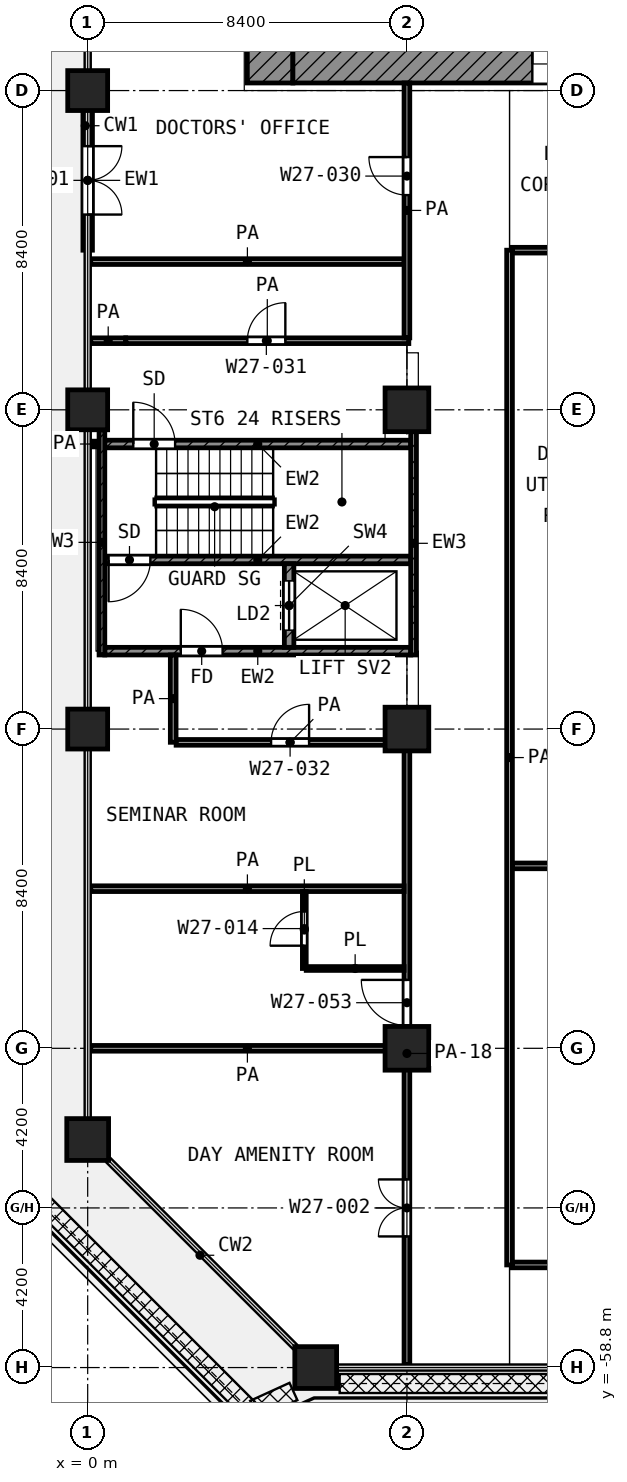
"""IFC4 building model, lengths in metres.
Left out: names, types, materials, properties, quantities, classifications, styles, units other than length and angle.
Written with IfcOpenShell. Run it as: python <this file> out.ifc"""

import sys

from ifc_helpers import new_model, si_unit, direction, frame, frame_2d, origin, origin_2d, place, context, subcontext, project, spatial, rectangle, extrude, element, fill, save


model = new_model("IFC4")
c1 = context("Model", 3, precision=1e-05, world=origin(), true_north=direction((0.0, 1.0)))
c2 = subcontext(c1, "Body", "Model", "MODEL_VIEW")
j1 = project(units=[si_unit("LENGTHUNIT", "METRE"), si_unit("PLANEANGLEUNIT", "RADIAN")], contexts=[c1])
p1 = place(None, origin())
s1 = spatial("IfcSite", under=j1, at=p1, CompositionType="ELEMENT")
p2 = place(p1, origin())
s2 = spatial("IfcBuilding", under=s1, at=p2, CompositionType="ELEMENT")
p3 = place(p2, frame((0.0, 0.0, 119.8)))
s3 = spatial("IfcBuildingStorey", under=s2, at=p3, CompositionType="ELEMENT", Elevation=119.8)
for number, where, z_axis, x_axis in (
    (1, (0.0, -25.2, 0.0), (0.0, 0.0, 1.0), (1.0, 0.0, 0.0)),
    (2, (0.0, -33.6, 0.0), (0.0, 0.0, 1.0), (1.0, 0.0, 0.0)),
):
    element("IfcColumn", number, at=place(p3, frame(where, z_axis=z_axis, x_axis=x_axis)), inside=s3, PredefinedType="COLUMN", context=c2, shape_type="SweptSolid", body=[
        extrude(rectangle(XDim=1.05, YDim=1.05, at=origin_2d()), origin(), (0.0, 0.0, 1.0), 4.2),
    ])
p4 = place(p3, frame((8.4, -33.6, 0.0), z_axis=(0.0, 0.0, 1.0), x_axis=(1.0, 0.0, 0.0)))
e3 = element("IfcColumn", 3, at=p4, inside=s3, PredefinedType="COLUMN", context=c2, shape_type="SweptSolid", body=[
    extrude(rectangle(XDim=1.15, YDim=1.15, at=origin_2d()), origin(), (0.0, 0.0, 1.0), 4.2),
])
p5 = place(p3, frame((0.0, -42.0, 0.0), z_axis=(0.0, 0.0, 1.0), x_axis=(1.0, 0.0, 0.0)))
e4 = element("IfcColumn", 4, at=p5, inside=s3, PredefinedType="COLUMN", context=c2, shape_type="SweptSolid", body=[
    extrude(rectangle(XDim=1.05, YDim=1.05, at=origin_2d()), origin(), (0.0, 0.0, 1.0), 4.2),
])
for number, where, z_axis, x_axis in (
    (5, (8.4, -42.0, 0.0), (0.0, 0.0, 1.0), (1.0, 0.0, 0.0)),
    (6, (8.4, -50.4, 0.0), (0.0, 0.0, 1.0), (1.0, 0.0, 0.0)),
):
    element("IfcColumn", number, at=place(p3, frame(where, z_axis=z_axis, x_axis=x_axis)), inside=s3, PredefinedType="COLUMN", context=c2, shape_type="SweptSolid", body=[
        extrude(rectangle(XDim=1.15, YDim=1.15, at=origin_2d()), origin(), (0.0, 0.0, 1.0), 4.2),
    ])
for number, where, z_axis, x_axis in (
    (7, (0.0, -52.8, 0.0), (0.0, 0.0, 1.0), (1.0, 0.0, 0.0)),
    (8, (6.0, -58.8, 0.0), (0.0, 0.0, 1.0), (1.0, 0.0, 0.0)),
):
    element("IfcColumn", number, at=place(p3, frame(where, z_axis=z_axis, x_axis=x_axis)), inside=s3, PredefinedType="COLUMN", context=c2, shape_type="SweptSolid", body=[
        extrude(rectangle(XDim=1.1, YDim=1.1, at=origin_2d()), origin(), (0.0, 0.0, 1.0), 4.2),
    ])
p6 = place(p3, frame((0.0, -25.725, 0.0), z_axis=(0.0, 0.0, 1.0), x_axis=(0.0, -1.0, 0.0)))
e9 = element("IfcWall", 9, at=p6, inside=s3, PredefinedType="SOLIDWALL", context=c2, shape_type="SweptSolid", body=[
    extrude(rectangle(XDim=3.675, YDim=0.25, at=frame_2d((1.837, 0.0))), origin(), (0.0, 0.0, 1.0), 3.48),
])
p7 = place(p6, frame((0.938, 0.0, 0.0)))
e10 = element("IfcOpeningElement", 10, at=p7, cuts=e9, PredefinedType="OPENING", context=c2, shape_type="SweptSolid", body=[
    extrude(rectangle(XDim=1.8, YDim=2.1, at=frame_2d((0.9, 1.05))), frame((0.0, 0.135, 0.0), z_axis=(0.0, -1.0, 0.0), x_axis=(1.0, 0.0, 0.0)), (0.0, 0.0, 1.0), 0.27),
])
p8 = place(p3, frame((4.8, -25.0, 0.0), z_axis=(0.0, 0.0, 1.0), x_axis=(0.0, 1.0, 0.0)))
e11 = element("IfcWall", 11, at=p8, inside=s3, PredefinedType="SHEAR", context=c2, shape_type="SweptSolid", body=[
    extrude(rectangle(XDim=19.6, YDim=1.2, at=frame_2d((9.8, 0.0))), origin(), (0.0, 0.0, 1.0), 3.6),
])
p9 = place(p8, frame((11.45, 0.0, 0.0)))
e12 = element("IfcOpeningElement", 12, at=p9, cuts=e11, PredefinedType="OPENING", context=c2, shape_type="SweptSolid", body=[
    extrude(rectangle(XDim=1.1, YDim=2.1, at=frame_2d((0.55, 1.05))), frame((0.0, 0.61, 0.0), z_axis=(0.0, -1.0, 0.0), x_axis=(1.0, 0.0, 0.0)), (0.0, 0.0, 1.0), 1.22),
])
p10 = place(p8, frame((2.15, 0.0, 0.0)))
e13 = element("IfcOpeningElement", 13, at=p10, cuts=e11, PredefinedType="OPENING", context=c2, shape_type="SweptSolid", body=[
    extrude(rectangle(XDim=1.1, YDim=2.1, at=frame_2d((0.55, 1.05))), frame((0.0, 0.61, 0.0), z_axis=(0.0, -1.0, 0.0), x_axis=(1.0, 0.0, 0.0)), (0.0, 0.0, 1.0), 1.22),
])
p11 = place(p3, frame((5.4, -24.5, 0.0), z_axis=(0.0, 0.0, 1.0), x_axis=(1.0, 0.0, 0.0)))
e14 = element("IfcWall", 14, at=p11, inside=s3, PredefinedType="SHEAR", context=c2, shape_type="SweptSolid", body=[
    extrude(rectangle(XDim=18.6, YDim=1.0, at=frame_2d((9.3, 0.0))), origin(), (0.0, 0.0, 1.0), 3.6),
])
p12 = place(p11, frame((6.3, 0.0, 0.0)))
e15 = element("IfcOpeningElement", 15, at=p12, cuts=e14, PredefinedType="OPENING", context=c2, shape_type="SweptSolid", body=[
    extrude(rectangle(XDim=1.8, YDim=2.1, at=frame_2d((0.9, 1.05))), frame((0.0, 0.51, 0.0), z_axis=(0.0, -1.0, 0.0), x_axis=(1.0, 0.0, 0.0)), (0.0, 0.0, 1.0), 1.02),
])
p13 = place(p3, frame((0.375, -40.05, 0.0), z_axis=(0.0, 0.0, 1.0), x_axis=(0.0, 1.0, 0.0)))
e16 = element("IfcWall", 16, at=p13, inside=s3, PredefinedType="SHEAR", context=c2, shape_type="SweptSolid", body=[
    extrude(rectangle(XDim=5.925, YDim=0.15, at=frame_2d((2.962, 0.0))), origin(), (0.0, 0.0, 1.0), 3.6),
])
p14 = place(p3, frame((8.575, -40.05, 0.0), z_axis=(0.0, 0.0, 1.0), x_axis=(0.0, 1.0, 0.0)))
e17 = element("IfcWall", 17, at=p14, inside=s3, PredefinedType="SHEAR", context=c2, shape_type="SweptSolid", body=[
    extrude(rectangle(XDim=5.875, YDim=0.15, at=frame_2d((2.938, 0.0))), origin(), (0.0, 0.0, 1.0), 3.6),
])
p15 = place(p3, frame((0.45, -34.5, 0.0), z_axis=(0.0, 0.0, 1.0), x_axis=(1.0, 0.0, 0.0)))
e18 = element("IfcWall", 18, at=p15, inside=s3, PredefinedType="SHEAR", context=c2, shape_type="SweptSolid", body=[
    extrude(rectangle(XDim=8.05, YDim=0.2, at=frame_2d((4.025, 0.0))), origin(), (0.0, 0.0, 1.0), 3.6),
])
p16 = place(p15, frame((0.75, 0.0, 0.0)))
e19 = element("IfcOpeningElement", 19, at=p16, cuts=e18, PredefinedType="OPENING", context=c2, shape_type="SweptSolid", body=[
    extrude(rectangle(XDim=1.1, YDim=2.1, at=frame_2d((0.55, 1.05))), frame((0.0, 0.11, 0.0), z_axis=(0.0, -1.0, 0.0), x_axis=(1.0, 0.0, 0.0)), (0.0, 0.0, 1.0), 0.22),
])
p17 = place(p3, frame((0.45, -37.55, 0.0), z_axis=(0.0, 0.0, 1.0), x_axis=(1.0, 0.0, 0.0)))
e20 = element("IfcWall", 20, at=p17, inside=s3, PredefinedType="SHEAR", context=c2, shape_type="SweptSolid", body=[
    extrude(rectangle(XDim=8.05, YDim=0.2, at=frame_2d((4.025, 0.0))), origin(), (0.0, 0.0, 1.0), 3.6),
])
p18 = place(p17, frame((0.1, 0.0, 0.0)))
e21 = element("IfcOpeningElement", 21, at=p18, cuts=e20, PredefinedType="OPENING", context=c2, shape_type="SweptSolid", body=[
    extrude(rectangle(XDim=1.1, YDim=2.1, at=frame_2d((0.55, 1.05))), frame((0.0, 0.11, 0.0), z_axis=(0.0, -1.0, 0.0), x_axis=(1.0, 0.0, 0.0)), (0.0, 0.0, 1.0), 0.22),
])
p19 = place(p3, frame((0.45, -39.95, 0.0), z_axis=(0.0, 0.0, 1.0), x_axis=(1.0, 0.0, 0.0)))
e22 = element("IfcWall", 22, at=p19, inside=s3, PredefinedType="SHEAR", context=c2, shape_type="SweptSolid", body=[
    extrude(rectangle(XDim=8.05, YDim=0.2, at=frame_2d((4.025, 0.0))), origin(), (0.0, 0.0, 1.0), 3.6),
])
p20 = place(p19, frame((2.0, 0.0, 0.0)))
e23 = element("IfcOpeningElement", 23, at=p20, cuts=e22, PredefinedType="OPENING", context=c2, shape_type="SweptSolid", body=[
    extrude(rectangle(XDim=1.1, YDim=2.1, at=frame_2d((0.55, 1.05))), frame((0.0, 0.11, 0.0), z_axis=(0.0, -1.0, 0.0), x_axis=(1.0, 0.0, 0.0)), (0.0, 0.0, 1.0), 0.22),
])
p21 = place(p3, frame((5.3, -39.85, 0.0), z_axis=(0.0, 0.0, 1.0), x_axis=(0.0, 1.0, 0.0)))
e24 = element("IfcWall", 24, at=p21, inside=s3, PredefinedType="SHEAR", context=c2, shape_type="SweptSolid", body=[
    extrude(rectangle(XDim=2.2, YDim=0.25, at=frame_2d((1.1, 0.0))), origin(), (0.0, 0.0, 1.0), 3.6),
])
p22 = place(p21, frame((0.45, 0.0, 0.0)))
e25 = element("IfcOpeningElement", 25, at=p22, cuts=e24, PredefinedType="OPENING", context=c2, shape_type="SweptSolid", body=[
    extrude(rectangle(XDim=1.3, YDim=2.1, at=frame_2d((0.65, 1.05))), frame((0.0, 0.135, 0.0), z_axis=(0.0, -1.0, 0.0), x_axis=(1.0, 0.0, 0.0)), (0.0, 0.0, 1.0), 0.27),
])
p23 = place(p3, frame((5.75, -48.3, 0.0), z_axis=(0.0, 0.0, 1.0), x_axis=(1.0, 0.0, 0.0)))
e26 = element("IfcWall", 26, at=p23, inside=s3, PredefinedType="PARTITIONING", context=c2, shape_type="SweptSolid", body=[
    extrude(rectangle(XDim=2.575, YDim=0.1, at=frame_2d((1.288, 0.0))), origin(), (0.0, 0.0, 1.0), 3.6),
])
p24 = place(p3, frame((5.7, -48.3, 0.0), z_axis=(0.0, 0.0, 1.0), x_axis=(0.0, 1.0, 0.0)))
e27 = element("IfcWall", 27, at=p24, inside=s3, PredefinedType="PARTITIONING", context=c2, shape_type="SweptSolid", body=[
    extrude(rectangle(XDim=2.025, YDim=0.1, at=frame_2d((1.013, 0.0))), origin(), (0.0, 0.0, 1.0), 3.6),
])
p25 = place(p24, frame((0.6, 0.0, 0.0)))
e28 = element("IfcOpeningElement", 28, at=p25, cuts=e27, PredefinedType="OPENING", context=c2, shape_type="SweptSolid", body=[
    extrude(rectangle(XDim=0.9, YDim=2.1, at=frame_2d((0.45, 1.05))), frame((0.0, 0.06, 0.0), z_axis=(0.0, -1.0, 0.0), x_axis=(1.0, 0.0, 0.0)), (0.0, 0.0, 1.0), 0.12),
])
p26 = place(p3, frame((11.175, -56.1, 0.0), z_axis=(0.0, 0.0, 1.0), x_axis=(1.0, 0.0, 0.0)))
e29 = element("IfcWall", 29, at=p26, inside=s3, PredefinedType="PARTITIONING", context=c2, shape_type="SweptSolid", body=[
    extrude(rectangle(XDim=2.85, YDim=0.15, at=frame_2d((1.425, 0.0))), origin(), (0.0, 0.0, 1.0), 3.6),
])
for number, where, z_axis, x_axis in (
    (30, (0.08, -50.4, 0.0), (0.0, 0.0, 1.0), (1.0, 0.0, 0.0)),
    (31, (0.08, -46.2, 0.0), (0.0, 0.0, 1.0), (1.0, 0.0, 0.0)),
):
    element("IfcWall", number, at=place(p3, frame(where, z_axis=z_axis, x_axis=x_axis)), inside=s3, PredefinedType="PARTITIONING", context=c2, shape_type="SweptSolid", body=[
        extrude(rectangle(XDim=8.245, YDim=0.15, at=frame_2d((4.123, 0.0))), origin(), (0.0, 0.0, 1.0), 3.6),
    ])
p27 = place(p3, frame((11.175, -45.6, 0.0), z_axis=(0.0, 0.0, 1.0), x_axis=(1.0, 0.0, 0.0)))
e32 = element("IfcWall", 32, at=p27, inside=s3, PredefinedType="PARTITIONING", context=c2, shape_type="SweptSolid", body=[
    extrude(rectangle(XDim=2.85, YDim=0.15, at=frame_2d((1.425, 0.0))), origin(), (0.0, 0.0, 1.0), 3.6),
])
p28 = place(p3, frame((2.327, -42.35, 0.0), z_axis=(0.0, 0.0, 1.0), x_axis=(1.0, 0.0, 0.0)))
e33 = element("IfcWall", 33, at=p28, inside=s3, PredefinedType="PARTITIONING", context=c2, shape_type="SweptSolid", body=[
    extrude(rectangle(XDim=5.998, YDim=0.15, at=frame_2d((2.999, 0.0))), origin(), (0.0, 0.0, 1.0), 3.6),
])
p29 = place(p28, frame((2.499, 0.0, 0.0)))
e34 = element("IfcOpeningElement", 34, at=p29, cuts=e33, PredefinedType="OPENING", context=c2, shape_type="SweptSolid", body=[
    extrude(rectangle(XDim=1.0, YDim=2.1, at=frame_2d((0.5, 1.05))), frame((0.0, 0.085, 0.0), z_axis=(0.0, -1.0, 0.0), x_axis=(1.0, 0.0, 0.0)), (0.0, 0.0, 1.0), 0.17),
])
p30 = place(p3, frame((0.08, -34.5, 0.0), z_axis=(0.0, 0.0, 1.0), x_axis=(1.0, 0.0, 0.0)))
e35 = element("IfcWall", 35, at=p30, inside=s3, PredefinedType="PARTITIONING", context=c2, shape_type="SweptSolid", body=[
    extrude(rectangle(XDim=0.19, YDim=0.15, at=frame_2d((0.095, 0.0))), origin(), (0.0, 0.0, 1.0), 3.6),
])
p31 = place(p3, frame((0.08, -31.782, 0.0), z_axis=(0.0, 0.0, 1.0), x_axis=(1.0, 0.0, 0.0)))
e36 = element("IfcWall", 36, at=p31, inside=s3, PredefinedType="PARTITIONING", context=c2, shape_type="SweptSolid", body=[
    extrude(rectangle(XDim=0.92, YDim=0.15, at=frame_2d((0.46, 0.0))), origin(), (0.0, 0.0, 1.0), 3.6),
])
p32 = place(p3, frame((1.002, -31.782, 0.0), z_axis=(0.0, 0.0, 1.0), x_axis=(1.0, 0.0, 0.0)))
e37 = element("IfcWall", 37, at=p32, inside=s3, PredefinedType="PARTITIONING", context=c2, shape_type="SweptSolid", body=[
    extrude(rectangle(XDim=7.448, YDim=0.15, at=frame_2d((3.724, 0.0))), origin(), (0.0, 0.0, 1.0), 3.6),
])
p33 = place(p32, frame((3.199, 0.0, 0.0)))
e38 = element("IfcOpeningElement", 38, at=p33, cuts=e37, PredefinedType="OPENING", context=c2, shape_type="SweptSolid", body=[
    extrude(rectangle(XDim=1.0, YDim=2.1, at=frame_2d((0.5, 1.05))), frame((0.0, 0.085, 0.0), z_axis=(0.0, -1.0, 0.0), x_axis=(1.0, 0.0, 0.0)), (0.0, 0.0, 1.0), 0.17),
])
p34 = place(p3, frame((0.08, -29.7, 0.0), z_axis=(0.0, 0.0, 1.0), x_axis=(1.0, 0.0, 0.0)))
e39 = element("IfcWall", 39, at=p34, inside=s3, PredefinedType="PARTITIONING", context=c2, shape_type="SweptSolid", body=[
    extrude(rectangle(XDim=8.245, YDim=0.15, at=frame_2d((4.123, 0.0))), origin(), (0.0, 0.0, 1.0), 3.6),
])
p35 = place(p3, frame((11.175, -29.4, 0.0), z_axis=(0.0, 0.0, 1.0), x_axis=(1.0, 0.0, 0.0)))
e40 = element("IfcWall", 40, at=p35, inside=s3, PredefinedType="PARTITIONING", context=c2, shape_type="SweptSolid", body=[
    extrude(rectangle(XDim=2.85, YDim=0.15, at=frame_2d((1.425, 0.0))), origin(), (0.0, 0.0, 1.0), 3.6),
])
p36 = place(p3, frame((2.25, -42.348, 0.0), z_axis=(0.0, 0.0, 1.0), x_axis=(0.0, 1.0, 0.0)))
e41 = element("IfcWall", 41, at=p36, inside=s3, PredefinedType="PARTITIONING", context=c2, shape_type="SweptSolid", body=[
    extrude(rectangle(XDim=2.298, YDim=0.15, at=frame_2d((1.149, 0.0))), origin(), (0.0, 0.0, 1.0), 3.6),
])
p37 = place(p3, frame((8.4, -58.72, 0.0), z_axis=(0.0, 0.0, 1.0), x_axis=(0.0, 1.0, 0.0)))
e42 = element("IfcWall", 42, at=p37, inside=s3, PredefinedType="PARTITIONING", context=c2, shape_type="SweptSolid", body=[
    extrude(rectangle(XDim=16.37, YDim=0.15, at=frame_2d((8.185, 0.0))), origin(), (0.0, 0.0, 1.0), 2.7),
])
p38 = place(p37, frame((8.92, 0.0, 0.0)))
e43 = element("IfcOpeningElement", 43, at=p38, cuts=e42, PredefinedType="OPENING", context=c2, shape_type="SweptSolid", body=[
    extrude(rectangle(XDim=1.2, YDim=2.1, at=frame_2d((0.6, 1.05))), frame((0.0, 0.085, 0.0), z_axis=(0.0, -1.0, 0.0), x_axis=(1.0, 0.0, 0.0)), (0.0, 0.0, 1.0), 0.17),
])
p39 = place(p37, frame((3.37, 0.0, 0.0)))
e44 = element("IfcOpeningElement", 44, at=p39, cuts=e42, PredefinedType="OPENING", context=c2, shape_type="SweptSolid", body=[
    extrude(rectangle(XDim=1.5, YDim=2.1, at=frame_2d((0.75, 1.05))), frame((0.0, 0.085, 0.0), z_axis=(0.0, -1.0, 0.0), x_axis=(1.0, 0.0, 0.0)), (0.0, 0.0, 1.0), 0.17),
])
p40 = place(p3, frame((8.4, -31.707, 0.0), z_axis=(0.0, 0.0, 1.0), x_axis=(0.0, 1.0, 0.0)))
e45 = element("IfcWall", 45, at=p40, inside=s3, PredefinedType="PARTITIONING", context=c2, shape_type="SweptSolid", body=[
    extrude(rectangle(XDim=6.707, YDim=0.15, at=frame_2d((3.354, 0.0))), origin(), (0.0, 0.0, 1.0), 3.6),
])
p41 = place(p40, frame((3.757, 0.0, 0.0)))
e46 = element("IfcOpeningElement", 46, at=p41, cuts=e45, PredefinedType="OPENING", context=c2, shape_type="SweptSolid", body=[
    extrude(rectangle(XDim=1.0, YDim=2.1, at=frame_2d((0.5, 1.05))), frame((0.0, 0.085, 0.0), z_axis=(0.0, -1.0, 0.0), x_axis=(1.0, 0.0, 0.0)), (0.0, 0.0, 1.0), 0.17),
])
p42 = place(p3, frame((11.1, -56.1, 0.0), z_axis=(0.0, 0.0, 1.0), x_axis=(0.0, 1.0, 0.0)))
e47 = element("IfcWall", 47, at=p42, inside=s3, PredefinedType="PARTITIONING", context=c2, shape_type="SweptSolid", body=[
    extrude(rectangle(XDim=26.7, YDim=0.15, at=frame_2d((13.35, 0.0))), origin(), (0.0, 0.0, 1.0), 3.6),
])
p43 = place(p7, origin())
e48 = element("IfcDoor", 48, at=p43, inside=s3, OperationType="DOUBLE_DOOR_SINGLE_SWING", PredefinedType="DOOR", context=c2, shape_type="SweptSolid", body=[
    extrude(rectangle(XDim=1.8, YDim=2.1, at=frame_2d((0.9, 1.05))), frame((0.0, 0.025, 0.0), z_axis=(0.0, -1.0, 0.0), x_axis=(1.0, 0.0, 0.0)), (0.0, 0.0, 1.0), 0.05),
])
fill(e10, e48)
p44 = place(p12, origin())
e49 = element("IfcDoor", 49, at=p44, inside=s3, OperationType="DOUBLE_DOOR_SINGLE_SWING", PredefinedType="DOOR", context=c2, shape_type="SweptSolid", body=[
    extrude(rectangle(XDim=1.8, YDim=2.1, at=frame_2d((0.9, 1.05))), frame((0.0, 0.025, 0.0), z_axis=(0.0, -1.0, 0.0), x_axis=(1.0, 0.0, 0.0)), (0.0, 0.0, 1.0), 0.05),
])
fill(e15, e49)
p45 = place(p16, origin())
e50 = element("IfcDoor", 50, at=p45, inside=s3, OperationType="SINGLE_SWING_LEFT", PredefinedType="DOOR", context=c2, shape_type="SweptSolid", body=[
    extrude(rectangle(XDim=1.1, YDim=2.1, at=frame_2d((0.55, 1.05))), frame((0.0, 0.025, 0.0), z_axis=(0.0, -1.0, 0.0), x_axis=(1.0, 0.0, 0.0)), (0.0, 0.0, 1.0), 0.05),
])
fill(e19, e50)
p46 = place(p18, frame((1.1, 0.0, 0.0), z_axis=(0.0, 0.0, 1.0), x_axis=(-1.0, 0.0, 0.0)))
e51 = element("IfcDoor", 51, at=p46, inside=s3, OperationType="SINGLE_SWING_LEFT", PredefinedType="DOOR", context=c2, shape_type="SweptSolid", body=[
    extrude(rectangle(XDim=1.1, YDim=2.1, at=frame_2d((0.55, 1.05))), frame((0.0, 0.025, 0.0), z_axis=(0.0, -1.0, 0.0), x_axis=(1.0, 0.0, 0.0)), (0.0, 0.0, 1.0), 0.05),
])
fill(e21, e51)
p47 = place(p22, origin())
e52 = element("IfcDoor", 52, at=p47, inside=s3, OperationType="DOUBLE_DOOR_SLIDING", PredefinedType="DOOR", context=c2, shape_type="SweptSolid", body=[
    extrude(rectangle(XDim=1.3, YDim=2.1, at=frame_2d((0.65, 1.05))), frame((0.0, 0.025, 0.0), z_axis=(0.0, -1.0, 0.0), x_axis=(1.0, 0.0, 0.0)), (0.0, 0.0, 1.0), 0.05),
])
fill(e25, e52)
p48 = place(p20, origin())
e53 = element("IfcDoor", 53, at=p48, inside=s3, OperationType="SINGLE_SWING_LEFT", PredefinedType="DOOR", context=c2, shape_type="SweptSolid", body=[
    extrude(rectangle(XDim=1.1, YDim=2.1, at=frame_2d((0.55, 1.05))), frame((0.0, 0.025, 0.0), z_axis=(0.0, -1.0, 0.0), x_axis=(1.0, 0.0, 0.0)), (0.0, 0.0, 1.0), 0.05),
])
fill(e23, e53)
p49 = place(p41, origin())
e54 = element("IfcDoor", 54, at=p49, inside=s3, OperationType="SINGLE_SWING_RIGHT", PredefinedType="DOOR", context=c2, shape_type="SweptSolid", body=[
    extrude(rectangle(XDim=1.0, YDim=2.1, at=frame_2d((0.5, 1.05))), frame((0.0, 0.025, 0.0), z_axis=(0.0, -1.0, 0.0), x_axis=(1.0, 0.0, 0.0)), (0.0, 0.0, 1.0), 0.05),
])
fill(e46, e54)
p50 = place(p33, origin())
e55 = element("IfcDoor", 55, at=p50, inside=s3, OperationType="SINGLE_SWING_RIGHT", PredefinedType="DOOR", context=c2, shape_type="SweptSolid", body=[
    extrude(rectangle(XDim=1.0, YDim=2.1, at=frame_2d((0.5, 1.05))), frame((0.0, 0.025, 0.0), z_axis=(0.0, -1.0, 0.0), x_axis=(1.0, 0.0, 0.0)), (0.0, 0.0, 1.0), 0.05),
])
fill(e38, e55)
p51 = place(p29, origin())
e56 = element("IfcDoor", 56, at=p51, inside=s3, OperationType="SINGLE_SWING_RIGHT", PredefinedType="DOOR", context=c2, shape_type="SweptSolid", body=[
    extrude(rectangle(XDim=1.0, YDim=2.1, at=frame_2d((0.5, 1.05))), frame((0.0, 0.025, 0.0), z_axis=(0.0, -1.0, 0.0), x_axis=(1.0, 0.0, 0.0)), (0.0, 0.0, 1.0), 0.05),
])
fill(e34, e56)
p52 = place(p38, origin())
e57 = element("IfcDoor", 57, at=p52, inside=s3, OperationType="SINGLE_SWING_RIGHT", PredefinedType="DOOR", context=c2, shape_type="SweptSolid", body=[
    extrude(rectangle(XDim=1.2, YDim=2.1, at=frame_2d((0.6, 1.05))), frame((0.0, 0.025, 0.0), z_axis=(0.0, -1.0, 0.0), x_axis=(1.0, 0.0, 0.0)), (0.0, 0.0, 1.0), 0.05),
])
fill(e43, e57)
p53 = place(p25, origin())
e58 = element("IfcDoor", 58, at=p53, inside=s3, OperationType="SINGLE_SWING_LEFT", PredefinedType="DOOR", context=c2, shape_type="SweptSolid", body=[
    extrude(rectangle(XDim=0.9, YDim=2.1, at=frame_2d((0.45, 1.05))), frame((0.0, 0.025, 0.0), z_axis=(0.0, -1.0, 0.0), x_axis=(1.0, 0.0, 0.0)), (0.0, 0.0, 1.0), 0.05),
])
fill(e28, e58)
p54 = place(p39, origin())
e59 = element("IfcDoor", 59, at=p54, inside=s3, OperationType="DOUBLE_DOOR_SINGLE_SWING", PredefinedType="DOOR", context=c2, shape_type="SweptSolid", body=[
    extrude(rectangle(XDim=1.5, YDim=2.1, at=frame_2d((0.75, 1.05))), frame((0.0, 0.025, 0.0), z_axis=(0.0, -1.0, 0.0), x_axis=(1.0, 0.0, 0.0)), (0.0, 0.0, 1.0), 0.05),
])
fill(e44, e59)
save(model, sys.argv[1])
